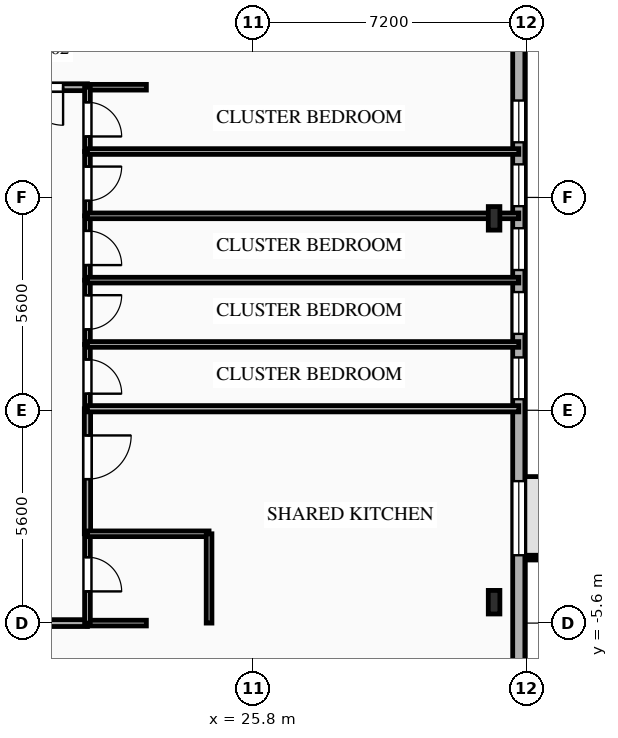
"""IFC4 building model, lengths in metres.
Left out: names, types, materials, properties, quantities, classifications, styles, units other than length and angle.
Written with IfcOpenShell. Run it as: python <this file> out.ifc"""

import sys

from ifc_helpers import new_model, si_unit, direction, frame, frame_2d, origin, origin_2d, place, context, subcontext, project, spatial, rectangle, i_section, extrude, element, fill, save


model = new_model("IFC4")
c1 = context("Model", 3, precision=1e-05, world=origin(), true_north=direction((0.0, 1.0)))
c2 = subcontext(c1, "Body", "Model", "MODEL_VIEW")
j1 = project(units=[si_unit("LENGTHUNIT", "METRE"), si_unit("PLANEANGLEUNIT", "RADIAN")], contexts=[c1])
p1 = place(None, origin())
s1 = spatial("IfcSite", under=j1, at=p1, CompositionType="ELEMENT")
p2 = place(p1, origin())
s2 = spatial("IfcBuilding", under=s1, at=p2, CompositionType="ELEMENT")
p3 = place(p2, frame((0.0, 0.0, 33.7)))
s3 = spatial("IfcBuildingStorey", under=s2, at=p3, CompositionType="ELEMENT", Elevation=33.7)
for number, where, z_axis, x_axis in (
    (1, (32.15, -5.05, 0.0), (0.0, 0.0, 1.0), (1.0, 0.0, 0.0)),
    (2, (32.15, 5.05, 0.0), (0.0, 0.0, 1.0), (1.0, 0.0, 0.0)),
):
    element("IfcColumn", number, at=place(p3, frame(where, z_axis=z_axis, x_axis=x_axis)), inside=s3, PredefinedType="COLUMN", context=c2, shape_type="SweptSolid", body=[
        extrude(i_section(OverallWidth=0.305, OverallDepth=0.62, WebThickness=0.021, FlangeThickness=0.04, FilletRadius=0.027, at=origin_2d()), origin(), (0.0, 0.0, 1.0), 3.35),
    ])
p4 = place(p3, frame((32.8, 15.8, 0.0), z_axis=(0.0, 0.0, 1.0), x_axis=(0.0, -1.0, 0.0)))
e3 = element("IfcWall", 3, at=p4, inside=s3, PredefinedType="SOLIDWALL", context=c2, shape_type="SweptSolid", body=[
    extrude(rectangle(XDim=31.6, YDim=0.32, at=frame_2d((15.8, 0.0))), origin(), (0.0, 0.0, 1.0), 3.035),
])
p5 = place(p4, frame((7.65, 0.0, 0.85)))
e4 = element("IfcOpeningElement", 4, at=p5, cuts=e3, PredefinedType="OPENING", context=c2, shape_type="SweptSolid", body=[
    extrude(rectangle(XDim=1.1, YDim=1.85, at=frame_2d((0.55, 0.925))), frame((0.0, 0.17, 0.0), z_axis=(0.0, -1.0, 0.0), x_axis=(1.0, 0.0, 0.0)), (0.0, 0.0, 1.0), 0.34),
])
p6 = place(p4, frame((9.33, 0.0, 0.85)))
e5 = element("IfcOpeningElement", 5, at=p6, cuts=e3, PredefinedType="OPENING", context=c2, shape_type="SweptSolid", body=[
    extrude(rectangle(XDim=1.1, YDim=1.85, at=frame_2d((0.55, 0.925))), frame((0.0, 0.17, 0.0), z_axis=(0.0, -1.0, 0.0), x_axis=(1.0, 0.0, 0.0)), (0.0, 0.0, 1.0), 0.34),
])
p7 = place(p4, frame((11.01, 0.0, 0.85)))
e6 = element("IfcOpeningElement", 6, at=p7, cuts=e3, PredefinedType="OPENING", context=c2, shape_type="SweptSolid", body=[
    extrude(rectangle(XDim=1.1, YDim=1.85, at=frame_2d((0.55, 0.925))), frame((0.0, 0.17, 0.0), z_axis=(0.0, -1.0, 0.0), x_axis=(1.0, 0.0, 0.0)), (0.0, 0.0, 1.0), 0.34),
])
p8 = place(p4, frame((12.69, 0.0, 0.85)))
e7 = element("IfcOpeningElement", 7, at=p8, cuts=e3, PredefinedType="OPENING", context=c2, shape_type="SweptSolid", body=[
    extrude(rectangle(XDim=1.1, YDim=1.85, at=frame_2d((0.55, 0.925))), frame((0.0, 0.17, 0.0), z_axis=(0.0, -1.0, 0.0), x_axis=(1.0, 0.0, 0.0)), (0.0, 0.0, 1.0), 0.34),
])
p9 = place(p4, frame((14.41, 0.0, 0.85)))
e8 = element("IfcOpeningElement", 8, at=p9, cuts=e3, PredefinedType="OPENING", context=c2, shape_type="SweptSolid", body=[
    extrude(rectangle(XDim=1.1, YDim=1.85, at=frame_2d((0.55, 0.925))), frame((0.0, 0.17, 0.0), z_axis=(0.0, -1.0, 0.0), x_axis=(1.0, 0.0, 0.0)), (0.0, 0.0, 1.0), 0.34),
])
p10 = place(p4, frame((17.665, 0.0, 0.85)))
e9 = element("IfcOpeningElement", 9, at=p10, cuts=e3, PredefinedType="OPENING", context=c2, shape_type="SweptSolid", body=[
    extrude(rectangle(XDim=1.95, YDim=1.85, at=frame_2d((0.975, 0.925))), frame((0.0, 0.17, 0.0), z_axis=(0.0, -1.0, 0.0), x_axis=(1.0, 0.0, 0.0)), (0.0, 0.0, 1.0), 0.34),
])
p11 = place(p3, frame((21.45, 8.5, 0.0), z_axis=(0.0, 0.0, 1.0), x_axis=(-1.0, 0.0, 0.0)))
e10 = element("IfcWall", 10, at=p11, inside=s3, PredefinedType="PARTITIONING", context=c2, shape_type="SweptSolid", body=[
    extrude(rectangle(XDim=2.65, YDim=0.18, at=frame_2d((1.325, 0.0))), origin(), (0.0, 0.0, 1.0), 3.035),
])
p12 = place(p11, frame((0.641, 0.0, 0.0)))
e11 = element("IfcOpeningElement", 11, at=p12, cuts=e10, PredefinedType="OPENING", context=c2, shape_type="SweptSolid", body=[
    extrude(rectangle(XDim=1.0, YDim=2.15, at=frame_2d((0.5, 1.075))), frame((0.0, 0.1, 0.0), z_axis=(0.0, -1.0, 0.0), x_axis=(1.0, 0.0, 0.0)), (0.0, 0.0, 1.0), 0.2),
])
p13 = place(p3, frame((23.0, 8.5, 0.0), z_axis=(0.0, 0.0, 1.0), x_axis=(-1.0, 0.0, 0.0)))
e12 = element("IfcWall", 12, at=p13, inside=s3, PredefinedType="PARTITIONING", context=c2, shape_type="SweptSolid", body=[
    extrude(rectangle(XDim=1.55, YDim=0.15, at=frame_2d((0.775, 0.0))), origin(), (0.0, 0.0, 1.0), 3.035),
])
p14 = place(p3, frame((18.8, -5.6, 0.0), z_axis=(0.0, 0.0, 1.0), x_axis=(1.0, 0.0, 0.0)))
e13 = element("IfcWall", 13, at=p14, inside=s3, PredefinedType="PARTITIONING", context=c2, shape_type="SweptSolid", body=[
    extrude(rectangle(XDim=2.65, YDim=0.18, at=frame_2d((1.325, 0.0))), origin(), (0.0, 0.0, 1.0), 3.035),
])
p15 = place(p3, frame((21.45, -5.6, 0.0), z_axis=(0.0, 0.0, 1.0), x_axis=(1.0, 0.0, 0.0)))
e14 = element("IfcWall", 14, at=p15, inside=s3, PredefinedType="PLUMBINGWALL", context=c2, shape_type="SweptSolid", body=[
    extrude(rectangle(XDim=1.55, YDim=0.15, at=frame_2d((0.775, 0.0))), origin(), (0.0, 0.0, 1.0), 3.035),
])
p16 = place(p3, frame((21.45, -3.25, 0.0), z_axis=(0.0, 0.0, 1.0), x_axis=(0.0, -1.0, 0.0)))
e15 = element("IfcWall", 15, at=p16, inside=s3, PredefinedType="PLUMBINGWALL", context=c2, shape_type="SweptSolid", body=[
    extrude(rectangle(XDim=2.35, YDim=0.15, at=frame_2d((1.175, 0.0))), origin(), (0.0, 0.0, 1.0), 3.035),
])
p17 = place(p16, frame((0.616, 0.0, 0.0)))
e16 = element("IfcOpeningElement", 16, at=p17, cuts=e15, PredefinedType="OPENING", context=c2, shape_type="SweptSolid", body=[
    extrude(rectangle(XDim=0.9, YDim=2.1, at=frame_2d((0.45, 1.05))), frame((0.0, 0.085, 0.0), z_axis=(0.0, -1.0, 0.0), x_axis=(1.0, 0.0, 0.0)), (0.0, 0.0, 1.0), 0.17),
])
p18 = place(p3, frame((21.45, 0.04, 0.0), z_axis=(0.0, 0.0, 1.0), x_axis=(0.0, -1.0, 0.0)))
e17 = element("IfcWall", 17, at=p18, inside=s3, PredefinedType="PARTITIONING", context=c2, shape_type="SweptSolid", body=[
    extrude(rectangle(XDim=3.29, YDim=0.165, at=frame_2d((1.645, 0.0))), origin(), (0.0, 0.0, 1.0), 3.035),
])
p19 = place(p18, frame((0.702, 0.0, 0.0)))
e18 = element("IfcOpeningElement", 18, at=p19, cuts=e17, PredefinedType="OPENING", context=c2, shape_type="SweptSolid", body=[
    extrude(rectangle(XDim=1.15, YDim=2.15, at=frame_2d((0.575, 1.075))), frame((0.0, 0.093, 0.0), z_axis=(0.0, -1.0, 0.0), x_axis=(1.0, 0.0, 0.0)), (0.0, 0.0, 1.0), 0.185),
])
p20 = place(p3, frame((21.45, 1.732, 0.0), z_axis=(0.0, 0.0, 1.0), x_axis=(0.0, -1.0, 0.0)))
e19 = element("IfcWall", 19, at=p20, inside=s3, PredefinedType="PARTITIONING", context=c2, shape_type="SweptSolid", body=[
    extrude(rectangle(XDim=1.692, YDim=0.15, at=frame_2d((0.846, 0.0))), origin(), (0.0, 0.0, 1.0), 3.035),
])
p21 = place(p20, frame((0.396, 0.0, 0.0)))
e20 = element("IfcOpeningElement", 20, at=p21, cuts=e19, PredefinedType="OPENING", context=c2, shape_type="SweptSolid", body=[
    extrude(rectangle(XDim=0.9, YDim=2.1, at=frame_2d((0.45, 1.05))), frame((0.0, 0.085, 0.0), z_axis=(0.0, -1.0, 0.0), x_axis=(1.0, 0.0, 0.0)), (0.0, 0.0, 1.0), 0.17),
])
p22 = place(p3, frame((21.45, 3.424, 0.0), z_axis=(0.0, 0.0, 1.0), x_axis=(0.0, -1.0, 0.0)))
e21 = element("IfcWall", 21, at=p22, inside=s3, PredefinedType="PARTITIONING", context=c2, shape_type="SweptSolid", body=[
    extrude(rectangle(XDim=1.692, YDim=0.15, at=frame_2d((0.846, 0.0))), origin(), (0.0, 0.0, 1.0), 3.035),
])
p23 = place(p22, frame((0.396, 0.0, 0.0)))
e22 = element("IfcOpeningElement", 22, at=p23, cuts=e21, PredefinedType="OPENING", context=c2, shape_type="SweptSolid", body=[
    extrude(rectangle(XDim=0.9, YDim=2.1, at=frame_2d((0.45, 1.05))), frame((0.0, 0.085, 0.0), z_axis=(0.0, -1.0, 0.0), x_axis=(1.0, 0.0, 0.0)), (0.0, 0.0, 1.0), 0.17),
])
p24 = place(p3, frame((21.45, 5.116, 0.0), z_axis=(0.0, 0.0, 1.0), x_axis=(0.0, -1.0, 0.0)))
e23 = element("IfcWall", 23, at=p24, inside=s3, PredefinedType="PARTITIONING", context=c2, shape_type="SweptSolid", body=[
    extrude(rectangle(XDim=1.692, YDim=0.15, at=frame_2d((0.846, 0.0))), origin(), (0.0, 0.0, 1.0), 3.035),
])
p25 = place(p24, frame((0.396, 0.0, 0.0)))
e24 = element("IfcOpeningElement", 24, at=p25, cuts=e23, PredefinedType="OPENING", context=c2, shape_type="SweptSolid", body=[
    extrude(rectangle(XDim=0.9, YDim=2.1, at=frame_2d((0.45, 1.05))), frame((0.0, 0.085, 0.0), z_axis=(0.0, -1.0, 0.0), x_axis=(1.0, 0.0, 0.0)), (0.0, 0.0, 1.0), 0.17),
])
p26 = place(p3, frame((21.45, 6.808, 0.0), z_axis=(0.0, 0.0, 1.0), x_axis=(0.0, -1.0, 0.0)))
e25 = element("IfcWall", 25, at=p26, inside=s3, PredefinedType="PARTITIONING", context=c2, shape_type="SweptSolid", body=[
    extrude(rectangle(XDim=1.692, YDim=0.15, at=frame_2d((0.846, 0.0))), origin(), (0.0, 0.0, 1.0), 3.035),
])
p27 = place(p26, frame((0.396, 0.0, 0.0)))
e26 = element("IfcOpeningElement", 26, at=p27, cuts=e25, PredefinedType="OPENING", context=c2, shape_type="SweptSolid", body=[
    extrude(rectangle(XDim=0.9, YDim=2.1, at=frame_2d((0.45, 1.05))), frame((0.0, 0.085, 0.0), z_axis=(0.0, -1.0, 0.0), x_axis=(1.0, 0.0, 0.0)), (0.0, 0.0, 1.0), 0.17),
])
p28 = place(p3, frame((21.45, 8.5, 0.0), z_axis=(0.0, 0.0, 1.0), x_axis=(0.0, -1.0, 0.0)))
e27 = element("IfcWall", 27, at=p28, inside=s3, PredefinedType="PARTITIONING", context=c2, shape_type="SweptSolid", body=[
    extrude(rectangle(XDim=1.692, YDim=0.15, at=frame_2d((0.846, 0.0))), origin(), (0.0, 0.0, 1.0), 3.035),
])
p29 = place(p28, frame((0.396, 0.0, 0.0)))
e28 = element("IfcOpeningElement", 28, at=p29, cuts=e27, PredefinedType="OPENING", context=c2, shape_type="SweptSolid", body=[
    extrude(rectangle(XDim=0.9, YDim=2.1, at=frame_2d((0.45, 1.05))), frame((0.0, 0.085, 0.0), z_axis=(0.0, -1.0, 0.0), x_axis=(1.0, 0.0, 0.0)), (0.0, 0.0, 1.0), 0.17),
])
p30 = place(p3, frame((21.45, -3.25, 0.0), z_axis=(0.0, 0.0, 1.0), x_axis=(1.0, 0.0, 0.0)))
e29 = element("IfcWall", 29, at=p30, inside=s3, PredefinedType="PLUMBINGWALL", context=c2, shape_type="SweptSolid", body=[
    extrude(rectangle(XDim=3.2, YDim=0.15, at=frame_2d((1.6, 0.0))), origin(), (0.0, 0.0, 1.0), 2.52),
])
p31 = place(p3, frame((24.65, -3.25, 0.0), z_axis=(0.0, 0.0, 1.0), x_axis=(0.0, -1.0, 0.0)))
e30 = element("IfcWall", 30, at=p31, inside=s3, PredefinedType="PLUMBINGWALL", context=c2, shape_type="SweptSolid", body=[
    extrude(rectangle(XDim=2.35, YDim=0.15, at=frame_2d((1.175, 0.0))), origin(), (0.0, 0.0, 1.0), 3.035),
])
p32 = place(p3, frame((21.45, 0.04, 0.0), z_axis=(0.0, 0.0, 1.0), x_axis=(1.0, 0.0, 0.0)))
e31 = element("IfcWall", 31, at=p32, inside=s3, PredefinedType="PARTITIONING", context=c2, shape_type="SweptSolid", body=[
    extrude(rectangle(XDim=11.35, YDim=0.165, at=frame_2d((5.675, 0.0))), origin(), (0.0, 0.0, 1.0), 3.035),
])
p33 = place(p3, frame((21.45, 1.732, 0.0), z_axis=(0.0, 0.0, 1.0), x_axis=(1.0, 0.0, 0.0)))
e32 = element("IfcWall", 32, at=p33, inside=s3, PredefinedType="PARTITIONING", context=c2, shape_type="SweptSolid", body=[
    extrude(rectangle(XDim=11.35, YDim=0.15, at=frame_2d((5.675, 0.0))), origin(), (0.0, 0.0, 1.0), 3.035),
])
for number, where, z_axis, x_axis in (
    (33, (21.45, 3.424, 0.0), (0.0, 0.0, 1.0), (1.0, 0.0, 0.0)),
    (34, (21.45, 5.116, 0.0), (0.0, 0.0, 1.0), (1.0, 0.0, 0.0)),
):
    element("IfcWall", number, at=place(p3, frame(where, z_axis=z_axis, x_axis=x_axis)), inside=s3, PredefinedType="PARTITIONING", context=c2, shape_type="SweptSolid", body=[
        extrude(rectangle(XDim=11.35, YDim=0.15, at=frame_2d((5.675, 0.0))), origin(), (0.0, 0.0, 1.0), 2.52),
    ])
p34 = place(p3, frame((21.45, 6.808, 0.0), z_axis=(0.0, 0.0, 1.0), x_axis=(1.0, 0.0, 0.0)))
e35 = element("IfcWall", 35, at=p34, inside=s3, PredefinedType="PARTITIONING", context=c2, shape_type="SweptSolid", body=[
    extrude(rectangle(XDim=11.35, YDim=0.15, at=frame_2d((5.675, 0.0))), origin(), (0.0, 0.0, 1.0), 3.035),
])
p35 = place(p5, origin())
e36 = element("IfcWindow", 36, at=p35, inside=s3, PartitioningType="SINGLE_PANEL", PredefinedType="WINDOW", context=c2, shape_type="SweptSolid", body=[
    extrude(rectangle(XDim=1.1, YDim=1.85, at=frame_2d((0.55, 0.925))), frame((0.0, 0.03, 0.0), z_axis=(0.0, -1.0, 0.0), x_axis=(1.0, 0.0, 0.0)), (0.0, 0.0, 1.0), 0.06),
])
fill(e4, e36)
p36 = place(p6, origin())
e37 = element("IfcWindow", 37, at=p36, inside=s3, PartitioningType="SINGLE_PANEL", PredefinedType="WINDOW", context=c2, shape_type="SweptSolid", body=[
    extrude(rectangle(XDim=1.1, YDim=1.85, at=frame_2d((0.55, 0.925))), frame((0.0, 0.03, 0.0), z_axis=(0.0, -1.0, 0.0), x_axis=(1.0, 0.0, 0.0)), (0.0, 0.0, 1.0), 0.06),
])
fill(e5, e37)
p37 = place(p7, origin())
e38 = element("IfcWindow", 38, at=p37, inside=s3, PartitioningType="SINGLE_PANEL", PredefinedType="WINDOW", context=c2, shape_type="SweptSolid", body=[
    extrude(rectangle(XDim=1.1, YDim=1.85, at=frame_2d((0.55, 0.925))), frame((0.0, 0.03, 0.0), z_axis=(0.0, -1.0, 0.0), x_axis=(1.0, 0.0, 0.0)), (0.0, 0.0, 1.0), 0.06),
])
fill(e6, e38)
p38 = place(p8, origin())
e39 = element("IfcWindow", 39, at=p38, inside=s3, PartitioningType="SINGLE_PANEL", PredefinedType="WINDOW", context=c2, shape_type="SweptSolid", body=[
    extrude(rectangle(XDim=1.1, YDim=1.85, at=frame_2d((0.55, 0.925))), frame((0.0, 0.03, 0.0), z_axis=(0.0, -1.0, 0.0), x_axis=(1.0, 0.0, 0.0)), (0.0, 0.0, 1.0), 0.06),
])
fill(e7, e39)
p39 = place(p9, origin())
e40 = element("IfcWindow", 40, at=p39, inside=s3, PartitioningType="SINGLE_PANEL", PredefinedType="WINDOW", context=c2, shape_type="SweptSolid", body=[
    extrude(rectangle(XDim=1.1, YDim=1.85, at=frame_2d((0.55, 0.925))), frame((0.0, 0.03, 0.0), z_axis=(0.0, -1.0, 0.0), x_axis=(1.0, 0.0, 0.0)), (0.0, 0.0, 1.0), 0.06),
])
fill(e8, e40)
p40 = place(p10, origin())
e41 = element("IfcWindow", 41, at=p40, inside=s3, PartitioningType="SINGLE_PANEL", PredefinedType="WINDOW", context=c2, shape_type="SweptSolid", body=[
    extrude(rectangle(XDim=1.95, YDim=1.85, at=frame_2d((0.975, 0.925))), frame((0.0, 0.03, 0.0), z_axis=(0.0, -1.0, 0.0), x_axis=(1.0, 0.0, 0.0)), (0.0, 0.0, 1.0), 0.06),
])
fill(e9, e41)
p41 = place(p12, origin())
e42 = element("IfcDoor", 42, at=p41, inside=s3, OperationType="SINGLE_SWING_LEFT", PredefinedType="DOOR", context=c2, shape_type="SweptSolid", body=[
    extrude(rectangle(XDim=1.0, YDim=2.15, at=frame_2d((0.5, 1.075))), frame((0.0, 0.025, 0.0), z_axis=(0.0, -1.0, 0.0), x_axis=(1.0, 0.0, 0.0)), (0.0, 0.0, 1.0), 0.05),
])
fill(e11, e42)
p42 = place(p17, origin())
e43 = element("IfcDoor", 43, at=p42, inside=s3, OperationType="SINGLE_SWING_RIGHT", PredefinedType="DOOR", context=c2, shape_type="SweptSolid", body=[
    extrude(rectangle(XDim=0.9, YDim=2.1, at=frame_2d((0.45, 1.05))), frame((0.0, 0.025, 0.0), z_axis=(0.0, -1.0, 0.0), x_axis=(1.0, 0.0, 0.0)), (0.0, 0.0, 1.0), 0.05),
])
fill(e16, e43)
p43 = place(p19, origin())
e44 = element("IfcDoor", 44, at=p43, inside=s3, OperationType="SINGLE_SWING_LEFT", PredefinedType="DOOR", context=c2, shape_type="SweptSolid", body=[
    extrude(rectangle(XDim=1.15, YDim=2.15, at=frame_2d((0.575, 1.075))), frame((0.0, 0.025, 0.0), z_axis=(0.0, -1.0, 0.0), x_axis=(1.0, 0.0, 0.0)), (0.0, 0.0, 1.0), 0.05),
])
fill(e18, e44)
p44 = place(p21, origin())
e45 = element("IfcDoor", 45, at=p44, inside=s3, OperationType="SINGLE_SWING_RIGHT", PredefinedType="DOOR", context=c2, shape_type="SweptSolid", body=[
    extrude(rectangle(XDim=0.9, YDim=2.1, at=frame_2d((0.45, 1.05))), frame((0.0, 0.025, 0.0), z_axis=(0.0, -1.0, 0.0), x_axis=(1.0, 0.0, 0.0)), (0.0, 0.0, 1.0), 0.05),
])
fill(e20, e45)
p45 = place(p23, origin())
e46 = element("IfcDoor", 46, at=p45, inside=s3, OperationType="SINGLE_SWING_LEFT", PredefinedType="DOOR", context=c2, shape_type="SweptSolid", body=[
    extrude(rectangle(XDim=0.9, YDim=2.1, at=frame_2d((0.45, 1.05))), frame((0.0, 0.025, 0.0), z_axis=(0.0, -1.0, 0.0), x_axis=(1.0, 0.0, 0.0)), (0.0, 0.0, 1.0), 0.05),
])
fill(e22, e46)
p46 = place(p25, origin())
e47 = element("IfcDoor", 47, at=p46, inside=s3, OperationType="SINGLE_SWING_RIGHT", PredefinedType="DOOR", context=c2, shape_type="SweptSolid", body=[
    extrude(rectangle(XDim=0.9, YDim=2.1, at=frame_2d((0.45, 1.05))), frame((0.0, 0.025, 0.0), z_axis=(0.0, -1.0, 0.0), x_axis=(1.0, 0.0, 0.0)), (0.0, 0.0, 1.0), 0.05),
])
fill(e24, e47)
p47 = place(p27, origin())
e48 = element("IfcDoor", 48, at=p47, inside=s3, OperationType="SINGLE_SWING_LEFT", PredefinedType="DOOR", context=c2, shape_type="SweptSolid", body=[
    extrude(rectangle(XDim=0.9, YDim=2.1, at=frame_2d((0.45, 1.05))), frame((0.0, 0.025, 0.0), z_axis=(0.0, -1.0, 0.0), x_axis=(1.0, 0.0, 0.0)), (0.0, 0.0, 1.0), 0.05),
])
fill(e26, e48)
p48 = place(p29, origin())
e49 = element("IfcDoor", 49, at=p48, inside=s3, OperationType="SINGLE_SWING_RIGHT", PredefinedType="DOOR", context=c2, shape_type="SweptSolid", body=[
    extrude(rectangle(XDim=0.9, YDim=2.1, at=frame_2d((0.45, 1.05))), frame((0.0, 0.025, 0.0), z_axis=(0.0, -1.0, 0.0), x_axis=(1.0, 0.0, 0.0)), (0.0, 0.0, 1.0), 0.05),
])
fill(e28, e49)
save(model, sys.argv[1])
